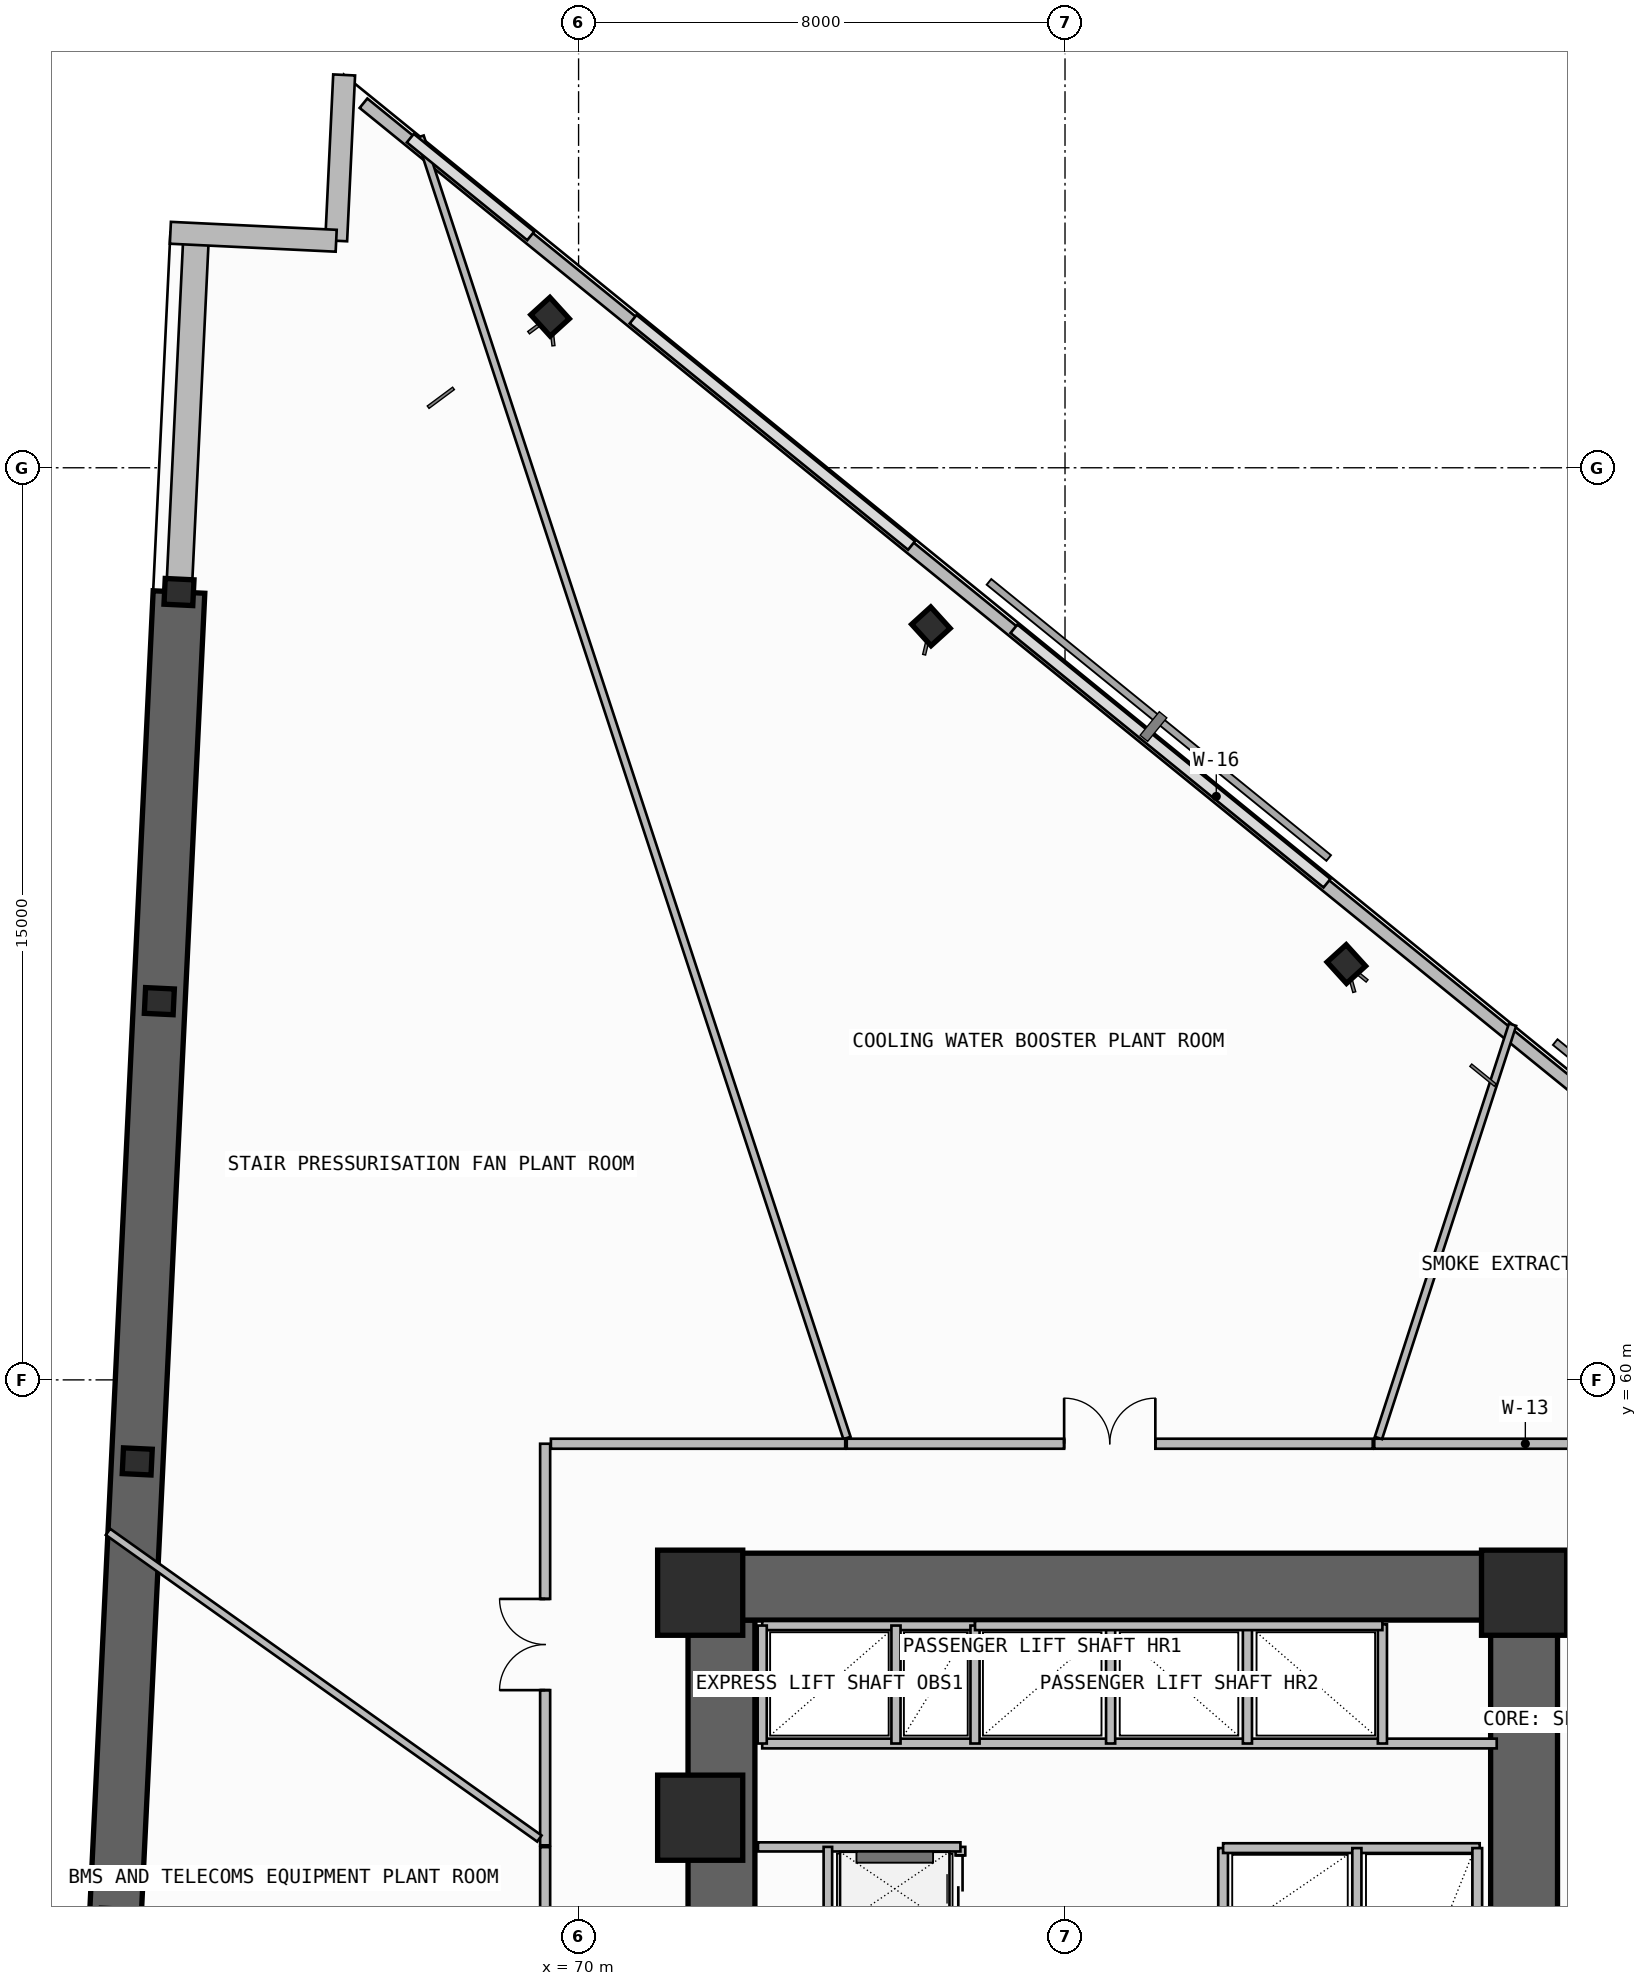
"""IFC4 building model, lengths in metres.
Left out: names, types, materials, properties, quantities, classifications, styles, units other than length and angle.
Written with IfcOpenShell. Run it as: python <this file> out.ifc"""

import sys

from ifc_helpers import new_model, si_unit, direction, frame, frame_2d, origin, origin_2d, place, context, subcontext, project, spatial, rectangle, i_section, extrude, element, fill, save


model = new_model("IFC4")
c1 = context("Model", 3, precision=1e-05, world=origin(), true_north=direction((0.0, 1.0)))
c2 = subcontext(c1, "Body", "Model", "MODEL_VIEW")
j1 = project(units=[si_unit("LENGTHUNIT", "METRE"), si_unit("PLANEANGLEUNIT", "RADIAN")], contexts=[c1])
p1 = place(None, origin())
s1 = spatial("IfcSite", under=j1, at=p1, CompositionType="ELEMENT")
p2 = place(p1, origin())
s2 = spatial("IfcBuilding", under=s1, at=p2, CompositionType="ELEMENT")
p3 = place(p2, frame((0.0, 0.0, 59.1)))
s3 = spatial("IfcBuildingStorey", under=s2, at=p3, CompositionType="ELEMENT", Elevation=59.1)
p4 = place(p3, frame((72.35, 43.35, -0.5), z_axis=(0.0, 0.0, 1.0), x_axis=(0.0, 1.0, 0.0)))
e1 = element("IfcWall", 1, at=p4, inside=s3, PredefinedType="SHEAR", context=c2, shape_type="SweptSolid", body=[
    extrude(rectangle(XDim=12.7, YDim=1.1, at=frame_2d((6.35, 0.0))), origin(), (0.0, 0.0, 1.0), 4.3),
])
p5 = place(p4, frame((1.35, 0.0, 0.5)))
e2 = element("IfcOpeningElement", 2, at=p5, cuts=e1, PredefinedType="OPENING", context=c2, shape_type="SweptSolid", body=[
    extrude(rectangle(XDim=1.2, YDim=2.2, at=frame_2d((0.6, 1.1))), frame((0.0, 0.56, 0.0), z_axis=(0.0, -1.0, 0.0), x_axis=(1.0, 0.0, 0.0)), (0.0, 0.0, 1.0), 1.12),
])
p6 = place(p3, frame((71.8, 56.6, -0.5), z_axis=(0.0, 0.0, 1.0), x_axis=(1.0, 0.0, 0.0)))
e3 = element("IfcWall", 3, at=p6, inside=s3, PredefinedType="SHEAR", context=c2, shape_type="SweptSolid", body=[
    extrude(rectangle(XDim=14.3, YDim=1.1, at=frame_2d((7.15, 0.0))), origin(), (0.0, 0.0, 1.0), 4.3),
])
p7 = place(p3, frame((85.55, 47.6, -0.5), z_axis=(0.0, 0.0, 1.0), x_axis=(0.0, 1.0, 0.0)))
e4 = element("IfcWall", 4, at=p7, inside=s3, PredefinedType="SHEAR", context=c2, shape_type="SweptSolid", body=[
    extrude(rectangle(XDim=8.45, YDim=1.1, at=frame_2d((4.225, 0.0))), origin(), (0.0, 0.0, 1.0), 4.3),
])
for number, where, z_axis, x_axis in (
    (5, (72.0, 52.8, 0.0), (0.0, 0.0, 1.0), (1.0, 0.0, 0.0)),
    (6, (72.0, 56.5, 0.0), (0.0, 0.0, 1.0), (1.0, 0.0, 0.0)),
    (7, (85.55, 56.5, 0.0), (0.0, 0.0, 1.0), (1.0, 0.0, 0.0)),
):
    element("IfcColumn", number, at=place(p3, frame(where, z_axis=z_axis, x_axis=x_axis)), inside=s3, PredefinedType="COLUMN", context=c2, shape_type="SweptSolid", body=[
        extrude(rectangle(XDim=1.4, YDim=1.4, at=origin_2d()), origin(), (0.0, 0.0, 1.0), 4.2),
    ])
for number, where, z_axis, x_axis in (
    (8, (82.627, 66.839, 0.0), (0.0, 0.0, 1.0), (0.74, 0.672, 0.0)),
    (9, (75.794, 72.392, 0.0), (0.0, 0.0, 1.0), (0.74, 0.672, 0.0)),
    (10, (69.531, 77.483, 0.0), (0.0, 0.0, 1.0), (0.74, 0.672, 0.0)),
    (11, (63.428, 72.957, 0.0), (0.0, 0.0, 1.0), (0.048, 0.999, 0.0)),
    (12, (63.105, 66.228, 0.0), (0.0, 0.0, 1.0), (0.048, 0.999, 0.0)),
    (13, (62.742, 58.659, 0.0), (0.0, 0.0, 1.0), (0.048, 0.999, 0.0)),
):
    element("IfcColumn", number, at=place(p3, frame(where, z_axis=z_axis, x_axis=x_axis)), inside=s3, PredefinedType="COLUMN", context=c2, shape_type="SweptSolid", body=[
        extrude(i_section(OverallWidth=0.424, OverallDepth=0.474, WebThickness=0.048, FlangeThickness=0.077, FilletRadius=0.015, at=origin_2d()), origin(), (0.0, 0.0, 1.0), 4.2),
    ])
p8 = place(p3, frame((63.711, 78.844, 0.0), z_axis=(0.0, 0.0, 1.0), x_axis=(-0.048007946398, -0.998846953784, 0.0)))
e14 = element("IfcWall", 14, at=p8, inside=s3, PredefinedType="SOLIDWALL", context=c2, shape_type="SweptSolid", body=[
    extrude(rectangle(XDim=5.894, YDim=0.42, at=frame_2d((2.947, 0.0))), origin(), (0.0, 0.0, 1.0), 2.777),
])
p9 = place(p3, frame((63.428, 72.957, -0.5), z_axis=(0.0, 0.0, 1.0), x_axis=(-0.047976309476, -0.998848473858, 0.0)))
e15 = element("IfcWall", 15, at=p9, inside=s3, PredefinedType="SHEAR", context=c2, shape_type="SweptSolid", body=[
    extrude(rectangle(XDim=21.892, YDim=0.85, at=frame_2d((10.946, 0.0))), origin(), (0.0, 0.0, 1.0), 4.3),
])
for number, where, z_axis, x_axis in (
    (16, (66.144, 81.46, 0.0), (0.0, 0.0, 1.0), (-0.048, -0.999, 0.0)),
    (17, (66.013, 78.733, 0.0), (0.0, 0.0, 1.0), (-0.999, 0.048, 0.0)),
):
    element("IfcWall", number, at=place(p3, frame(where, z_axis=z_axis, x_axis=x_axis)), inside=s3, PredefinedType="SOLIDWALL", context=c2, shape_type="SweptSolid", body=[
        extrude(rectangle(XDim=2.73, YDim=0.36, at=frame_2d((1.365, 0.0))), origin(), (0.0, 0.0, 1.0), 3.8),
    ])
p10 = place(p3, frame((94.513, 58.196, 0.0), z_axis=(0.0, 0.0, 1.0), x_axis=(-0.776001602097, 0.630730935933, 0.0)))
e18 = element("IfcWall", 18, at=p10, inside=s3, PredefinedType="PARAPET", context=c2, shape_type="SweptSolid", body=[
    extrude(rectangle(XDim=36.148, YDim=0.2, at=frame_2d((18.074, 0.0))), origin(), (0.0, 0.0, 1.0), 1.15),
])
p11 = place(p3, frame((76.28, 47.18, 0.0), z_axis=(0.0, 0.0, 1.0), x_axis=(0.0, 1.0, 0.0)))
e19 = element("IfcWall", 19, at=p11, inside=s3, PredefinedType="SOLIDWALL", context=c2, shape_type="SweptSolid", body=[
    extrude(rectangle(XDim=5.14, YDim=0.16, at=frame_2d((2.57, 0.0))), origin(), (0.0, 0.0, 1.0), 3.8),
])
p12 = place(p11, frame((1.1, 0.0, 0.0)))
e20 = element("IfcOpeningElement", 20, at=p12, cuts=e19, PredefinedType="OPENING", context=c2, shape_type="SweptSolid", body=[
    extrude(rectangle(XDim=1.1, YDim=2.25, at=frame_2d((0.55, 1.125))), frame((0.0, 0.09, 0.0), z_axis=(0.0, -1.0, 0.0), x_axis=(1.0, 0.0, 0.0)), (0.0, 0.0, 1.0), 0.18),
])
p13 = place(p11, frame((2.5, 0.0, 0.0)))
e21 = element("IfcOpeningElement", 21, at=p13, cuts=e19, PredefinedType="OPENING", context=c2, shape_type="SweptSolid", body=[
    extrude(rectangle(XDim=1.1, YDim=2.25, at=frame_2d((0.55, 1.125))), frame((0.0, 0.09, 0.0), z_axis=(0.0, -1.0, 0.0), x_axis=(1.0, 0.0, 0.0)), (0.0, 0.0, 1.0), 0.18),
])
p14 = place(p11, frame((3.9, 0.0, 0.0)))
e22 = element("IfcOpeningElement", 22, at=p14, cuts=e19, PredefinedType="OPENING", context=c2, shape_type="SweptSolid", body=[
    extrude(rectangle(XDim=1.1, YDim=2.25, at=frame_2d((0.55, 1.125))), frame((0.0, 0.09, 0.0), z_axis=(0.0, -1.0, 0.0), x_axis=(1.0, 0.0, 0.0)), (0.0, 0.0, 1.0), 0.18),
])
p15 = place(p11, frame((0.12, 0.0, 0.0)))
e23 = element("IfcOpeningElement", 23, at=p15, cuts=e19, PredefinedType="OPENING", context=c2, shape_type="SweptSolid", body=[
    extrude(rectangle(XDim=0.85, YDim=2.05, at=frame_2d((0.425, 1.025))), frame((0.0, 0.09, 0.0), z_axis=(0.0, -1.0, 0.0), x_axis=(1.0, 0.0, 0.0)), (0.0, 0.0, 1.0), 0.18),
])
p16 = place(p3, frame((72.95, 52.32, 0.0), z_axis=(0.0, 0.0, 1.0), x_axis=(1.0, 0.0, 0.0)))
e24 = element("IfcWall", 24, at=p16, inside=s3, PredefinedType="SOLIDWALL", context=c2, shape_type="SweptSolid", body=[
    extrude(rectangle(XDim=3.33, YDim=0.15, at=frame_2d((1.665, 0.0))), origin(), (0.0, 0.0, 1.0), 3.8),
])
p17 = place(p3, frame((74.1, 48.16, 0.0), z_axis=(0.0, 0.0, 1.0), x_axis=(0.0, 1.0, 0.0)))
e25 = element("IfcWall", 25, at=p17, inside=s3, PredefinedType="PLUMBINGWALL", context=c2, shape_type="SweptSolid", body=[
    extrude(rectangle(XDim=4.16, YDim=0.14, at=frame_2d((2.08, 0.0))), origin(), (0.0, 0.0, 1.0), 3.8),
])
p18 = place(p3, frame((80.6, 47.7, 0.0), z_axis=(0.0, 0.0, 1.0), x_axis=(0.0, 1.0, 0.0)))
e26 = element("IfcWall", 26, at=p18, inside=s3, PredefinedType="SOLIDWALL", context=c2, shape_type="SweptSolid", body=[
    extrude(rectangle(XDim=4.6, YDim=0.16, at=frame_2d((2.3, 0.0))), origin(), (0.0, 0.0, 1.0), 3.8),
])
p19 = place(p3, frame((80.6, 52.3, 0.0), z_axis=(0.0, 0.0, 1.0), x_axis=(1.0, 0.0, 0.0)))
e27 = element("IfcWall", 27, at=p19, inside=s3, PredefinedType="SOLIDWALL", context=c2, shape_type="SweptSolid", body=[
    extrude(rectangle(XDim=4.22, YDim=0.16, at=frame_2d((2.11, 0.0))), origin(), (0.0, 0.0, 1.0), 3.8),
])
p20 = place(p3, frame((82.8, 47.7, 0.0), z_axis=(0.0, 0.0, 1.0), x_axis=(0.0, 1.0, 0.0)))
e28 = element("IfcWall", 28, at=p20, inside=s3, PredefinedType="PLUMBINGWALL", context=c2, shape_type="SweptSolid", body=[
    extrude(rectangle(XDim=4.6, YDim=0.15, at=frame_2d((2.3, 0.0))), origin(), (0.0, 0.0, 1.0), 3.8),
])
p21 = place(p3, frame((84.78, 47.7, 0.0), z_axis=(0.0, 0.0, 1.0), x_axis=(0.0, 1.0, 0.0)))
e29 = element("IfcWall", 29, at=p21, inside=s3, PredefinedType="SOLIDWALL", context=c2, shape_type="SweptSolid", body=[
    extrude(rectangle(XDim=4.6, YDim=0.16, at=frame_2d((2.3, 0.0))), origin(), (0.0, 0.0, 1.0), 3.8),
])
p22 = place(p3, frame((73.02, 54.02, 0.0), z_axis=(0.0, 0.0, 1.0), x_axis=(1.0, 0.0, 0.0)))
e30 = element("IfcWall", 30, at=p22, inside=s3, PredefinedType="SOLIDWALL", context=c2, shape_type="SweptSolid", body=[
    extrude(rectangle(XDim=12.08, YDim=0.16, at=frame_2d((6.04, 0.0))), origin(), (0.0, 0.0, 1.0), 3.8),
])
p23 = place(p3, frame((73.02, 55.96, 0.0), z_axis=(0.0, 0.0, 1.0), x_axis=(1.0, 0.0, 0.0)))
e31 = element("IfcWall", 31, at=p23, inside=s3, PredefinedType="SOLIDWALL", context=c2, shape_type="SweptSolid", body=[
    extrude(rectangle(XDim=3.5, YDim=0.15, at=frame_2d((1.75, 0.0))), origin(), (0.0, 0.0, 1.0), 3.8),
])
p24 = place(p3, frame((73.02, 54.02, 0.0), z_axis=(0.0, 0.0, 1.0), x_axis=(0.0, 1.0, 0.0)))
e32 = element("IfcWall", 32, at=p24, inside=s3, PredefinedType="PLUMBINGWALL", context=c2, shape_type="SweptSolid", body=[
    extrude(rectangle(XDim=1.94, YDim=0.15, at=frame_2d((0.97, 0.0))), origin(), (0.0, 0.0, 1.0), 3.8),
])
p25 = place(p3, frame((76.52, 54.02, 0.0), z_axis=(0.0, 0.0, 1.0), x_axis=(0.0, 1.0, 0.0)))
e33 = element("IfcWall", 33, at=p25, inside=s3, PredefinedType="SOLIDWALL", context=c2, shape_type="SweptSolid", body=[
    extrude(rectangle(XDim=1.94, YDim=0.15, at=frame_2d((0.97, 0.0))), origin(), (0.0, 0.0, 1.0), 3.8),
])
p26 = place(p3, frame((75.22, 54.02, 0.0), z_axis=(0.0, 0.0, 1.0), x_axis=(0.0, 1.0, 0.0)))
e34 = element("IfcWall", 34, at=p26, inside=s3, PredefinedType="PLUMBINGWALL", context=c2, shape_type="SweptSolid", body=[
    extrude(rectangle(XDim=1.94, YDim=0.15, at=frame_2d((0.97, 0.0))), origin(), (0.0, 0.0, 1.0), 3.8),
])
for number, where, z_axis, x_axis in (
    (35, (78.75, 54.02, 0.0), (0.0, 0.0, 1.0), (0.0, 1.0, 0.0)),
    (36, (81.0, 54.02, 0.0), (0.0, 0.0, 1.0), (0.0, 1.0, 0.0)),
):
    element("IfcWall", number, at=place(p3, frame(where, z_axis=z_axis, x_axis=x_axis)), inside=s3, PredefinedType="PLUMBINGWALL", context=c2, shape_type="SweptSolid", body=[
        extrude(rectangle(XDim=1.96, YDim=0.15, at=frame_2d((0.98, 0.0))), origin(), (0.0, 0.0, 1.0), 3.8),
    ])
p27 = place(p3, frame((83.22, 54.02, 0.0), z_axis=(0.0, 0.0, 1.0), x_axis=(0.0, 1.0, 0.0)))
e37 = element("IfcWall", 37, at=p27, inside=s3, PredefinedType="SOLIDWALL", context=c2, shape_type="SweptSolid", body=[
    extrude(rectangle(XDim=1.96, YDim=0.15, at=frame_2d((0.98, 0.0))), origin(), (0.0, 0.0, 1.0), 3.8),
])
p28 = place(p3, frame((76.52, 55.96, 0.0), z_axis=(0.0, 0.0, 1.0), x_axis=(1.0, 0.0, 0.0)))
e38 = element("IfcWall", 38, at=p28, inside=s3, PredefinedType="SOLIDWALL", context=c2, shape_type="SweptSolid", body=[
    extrude(rectangle(XDim=6.7, YDim=0.15, at=frame_2d((3.35, 0.0))), origin(), (0.0, 0.0, 1.0), 3.8),
])
p29 = place(p3, frame((88.055, 58.95, 0.0), z_axis=(0.0, 0.0, 1.0), x_axis=(-1.0, 0.0, 0.0)))
e39 = element("IfcWall", 39, at=p29, inside=s3, PredefinedType="PARTITIONING", context=c2, shape_type="SweptSolid", body=[
    extrude(rectangle(XDim=4.969, YDim=0.165, at=frame_2d((2.485, 0.0))), origin(), (0.0, 0.0, 1.0), 2.777),
])
p30 = place(p3, frame((83.155, 59.044, 0.0), z_axis=(0.0, 0.0, 1.0), x_axis=(0.308684326179, 0.951164542427, 0.0)))
e40 = element("IfcWall", 40, at=p30, inside=s3, PredefinedType="PARTITIONING", context=c2, shape_type="SweptSolid", body=[
    extrude(rectangle(XDim=7.146, YDim=0.125, at=frame_2d((3.573, 0.0))), origin(), (0.0, 0.0, 1.0), 2.777),
])
p31 = place(p3, frame((83.061, 58.95, 0.0), z_axis=(0.0, 0.0, 1.0), x_axis=(-1.0, 0.0, 0.0)))
e41 = element("IfcWall", 41, at=p31, inside=s3, PredefinedType="PARTITIONING", context=c2, shape_type="SweptSolid", body=[
    extrude(rectangle(XDim=8.65, YDim=0.165, at=frame_2d((4.325, 0.0))), origin(), (0.0, 0.0, 1.0), 3.8),
])
p32 = place(p31, frame((3.575, 0.0, 0.0)))
e42 = element("IfcOpeningElement", 42, at=p32, cuts=e41, PredefinedType="OPENING", context=c2, shape_type="SweptSolid", body=[
    extrude(rectangle(XDim=1.5, YDim=2.25, at=frame_2d((0.75, 1.125))), frame((0.0, 0.093, 0.0), z_axis=(0.0, -1.0, 0.0), x_axis=(1.0, 0.0, 0.0)), (0.0, 0.0, 1.0), 0.185),
])
p33 = place(p3, frame((74.414, 59.044, 0.0), z_axis=(0.0, 0.0, 1.0), x_axis=(-0.311710476801, 0.950177130146, 0.0)))
e43 = element("IfcWall", 43, at=p33, inside=s3, PredefinedType="PARTITIONING", context=c2, shape_type="SweptSolid", body=[
    extrude(rectangle(XDim=22.522, YDim=0.125, at=frame_2d((11.261, 0.0))), origin(), (0.0, 0.0, 1.0), 2.777),
])
p34 = place(p3, frame((69.45, 58.95, 0.0), z_axis=(0.0, 0.0, 1.0), x_axis=(0.0, -1.0, 0.0)))
e44 = element("IfcWall", 44, at=p34, inside=s3, PredefinedType="PARTITIONING", context=c2, shape_type="SweptSolid", body=[
    extrude(rectangle(XDim=6.604, YDim=0.165, at=frame_2d((3.302, 0.0))), origin(), (0.0, 0.0, 1.0), 2.777),
])
p35 = place(p34, frame((2.552, 0.0, 0.0)))
e45 = element("IfcOpeningElement", 45, at=p35, cuts=e44, PredefinedType="OPENING", context=c2, shape_type="SweptSolid", body=[
    extrude(rectangle(XDim=1.5, YDim=2.25, at=frame_2d((0.75, 1.125))), frame((0.0, 0.093, 0.0), z_axis=(0.0, -1.0, 0.0), x_axis=(1.0, 0.0, 0.0)), (0.0, 0.0, 1.0), 0.185),
])
p36 = place(p3, frame((74.385, 58.95, 0.0), z_axis=(0.0, 0.0, 1.0), x_axis=(-1.0, 0.0, 0.0)))
e46 = element("IfcWall", 46, at=p36, inside=s3, PredefinedType="PARTITIONING", context=c2, shape_type="SweptSolid", body=[
    extrude(rectangle(XDim=4.841, YDim=0.165, at=frame_2d((2.42, 0.0))), origin(), (0.0, 0.0, 1.0), 2.777),
])
p37 = place(p3, frame((69.355, 52.458, 0.0), z_axis=(0.0, 0.0, 1.0), x_axis=(-0.815095714188, 0.579326312809, 0.0)))
e47 = element("IfcWall", 47, at=p37, inside=s3, PredefinedType="PARTITIONING", context=c2, shape_type="SweptSolid", body=[
    extrude(rectangle(XDim=8.704, YDim=0.125, at=frame_2d((4.352, 0.0))), origin(), (0.0, 0.0, 1.0), 2.777),
])
p38 = place(p3, frame((69.45, 52.316, 0.0), z_axis=(0.0, 0.0, 1.0), x_axis=(0.0, -1.0, 0.0)))
e48 = element("IfcWall", 48, at=p38, inside=s3, PredefinedType="PARTITIONING", context=c2, shape_type="SweptSolid", body=[
    extrude(rectangle(XDim=6.745, YDim=0.165, at=frame_2d((3.373, 0.0))), origin(), (0.0, 0.0, 1.0), 2.777),
])
p39 = place(p38, frame((2.623, 0.0, 0.0)))
e49 = element("IfcOpeningElement", 49, at=p39, cuts=e48, PredefinedType="OPENING", context=c2, shape_type="SweptSolid", body=[
    extrude(rectangle(XDim=1.5, YDim=2.25, at=frame_2d((0.75, 1.125))), frame((0.0, 0.093, 0.0), z_axis=(0.0, -1.0, 0.0), x_axis=(1.0, 0.0, 0.0)), (0.0, 0.0, 1.0), 0.185),
])
p40 = place(p14, origin())
e50 = element("IfcDoor", 50, at=p40, inside=s3, OperationType="DOUBLE_DOOR_SLIDING", PredefinedType="DOOR", context=c2, shape_type="SweptSolid", body=[
    extrude(rectangle(XDim=1.1, YDim=2.25, at=frame_2d((0.55, 1.125))), frame((0.0, 0.025, 0.0), z_axis=(0.0, -1.0, 0.0), x_axis=(1.0, 0.0, 0.0)), (0.0, 0.0, 1.0), 0.05),
])
fill(e22, e50)
p41 = place(p32, frame((1.5, 0.0, 0.0), z_axis=(0.0, 0.0, 1.0), x_axis=(-1.0, 0.0, 0.0)))
e51 = element("IfcDoor", 51, at=p41, inside=s3, OperationType="DOUBLE_DOOR_SINGLE_SWING", PredefinedType="DOOR", context=c2, shape_type="SweptSolid", body=[
    extrude(rectangle(XDim=1.5, YDim=2.25, at=frame_2d((0.75, 1.125))), frame((0.0, 0.025, 0.0), z_axis=(0.0, -1.0, 0.0), x_axis=(1.0, 0.0, 0.0)), (0.0, 0.0, 1.0), 0.05),
])
fill(e42, e51)
p42 = place(p35, frame((1.5, 0.0, 0.0), z_axis=(0.0, 0.0, 1.0), x_axis=(-1.0, 0.0, 0.0)))
e52 = element("IfcDoor", 52, at=p42, inside=s3, OperationType="DOUBLE_DOOR_SINGLE_SWING", PredefinedType="DOOR", context=c2, shape_type="SweptSolid", body=[
    extrude(rectangle(XDim=1.5, YDim=2.25, at=frame_2d((0.75, 1.125))), frame((0.0, 0.025, 0.0), z_axis=(0.0, -1.0, 0.0), x_axis=(1.0, 0.0, 0.0)), (0.0, 0.0, 1.0), 0.05),
])
fill(e45, e52)
save(model, sys.argv[1])
